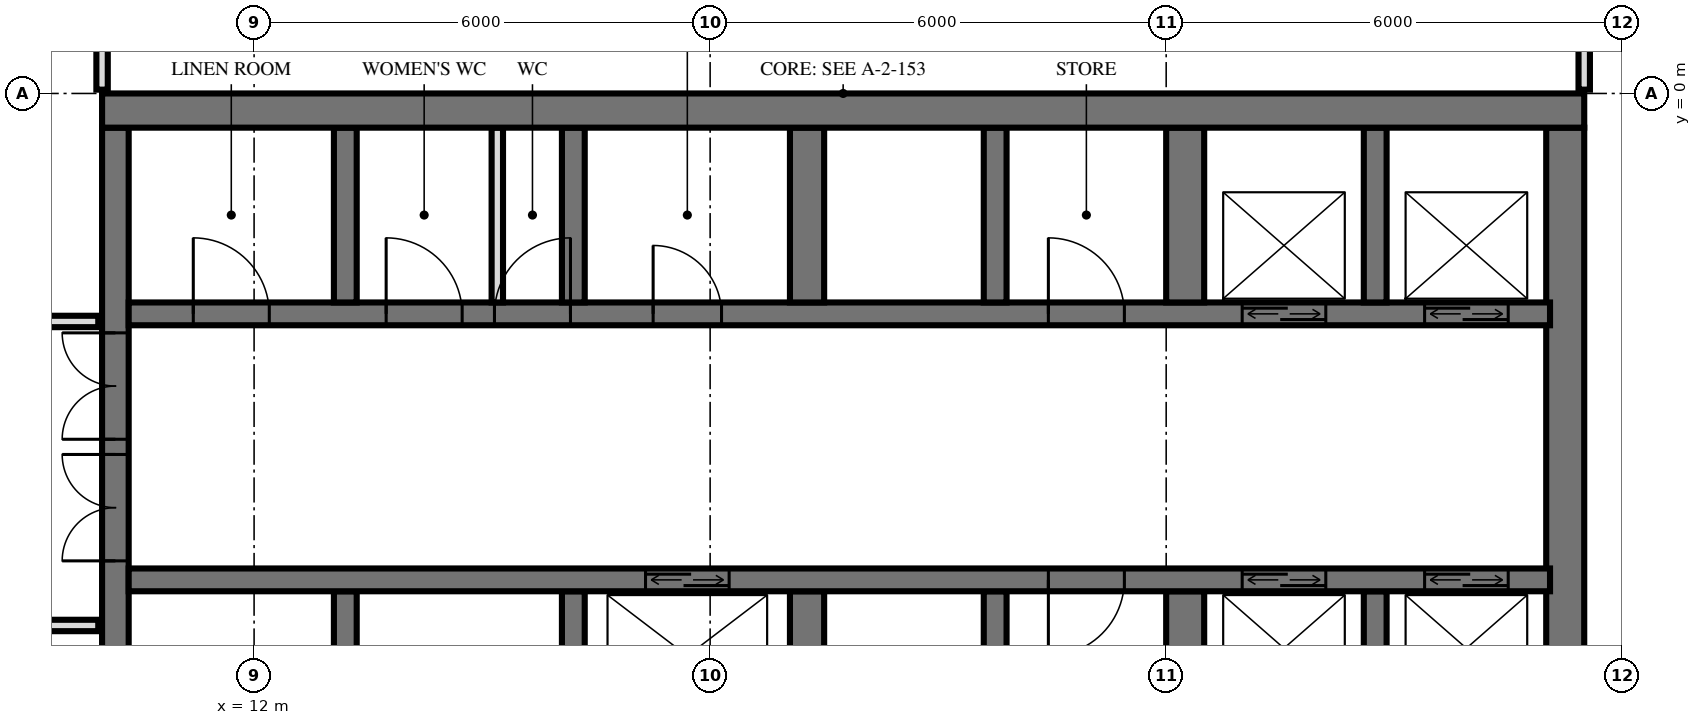
"""IFC4 building model, lengths in metres.
Left out: names, types, materials, properties, quantities, classifications, styles, units other than length and angle.
Written with IfcOpenShell. Run it as: python <this file> out.ifc"""

import sys

from ifc_helpers import new_model, si_unit, direction, frame, frame_2d, origin, place, context, subcontext, project, spatial, rectangle, extrude, element, fill, save


model = new_model("IFC4")
c1 = context("Model", 3, precision=1e-05, world=origin(), true_north=direction((0.0, 1.0)))
c2 = subcontext(c1, "Body", "Model", "MODEL_VIEW")
j1 = project(units=[si_unit("LENGTHUNIT", "METRE"), si_unit("PLANEANGLEUNIT", "RADIAN")], contexts=[c1])
p1 = place(None, origin())
s1 = spatial("IfcSite", under=j1, at=p1, CompositionType="ELEMENT")
p2 = place(p1, origin())
s2 = spatial("IfcBuilding", under=s1, at=p2, CompositionType="ELEMENT")
p3 = place(p2, frame((0.0, 0.0, 88.8)))
s3 = spatial("IfcBuildingStorey", under=s2, at=p3, CompositionType="ELEMENT", Elevation=88.8)
p4 = place(p3, frame((10.0, -0.225, 0.0), z_axis=(0.0, 0.0, 1.0), x_axis=(1.0, 0.0, 0.0)))
e1 = element("IfcWall", 1, at=p4, inside=s3, PredefinedType="SHEAR", context=c2, shape_type="SweptSolid", body=[
    extrude(rectangle(XDim=19.5, YDim=0.45, at=frame_2d((9.75, 0.0))), origin(), (0.0, 0.0, 1.0), 3.6),
])
p5 = place(p3, frame((10.175, -14.55, 0.0), z_axis=(0.0, 0.0, 1.0), x_axis=(0.0, 1.0, 0.0)))
e2 = element("IfcWall", 2, at=p5, inside=s3, PredefinedType="SHEAR", context=c2, shape_type="SweptSolid", body=[
    extrude(rectangle(XDim=14.1, YDim=0.35, at=frame_2d((7.05, 0.0))), origin(), (0.0, 0.0, 1.0), 3.6),
])
p6 = place(p5, frame((8.4, 0.0, 0.0)))
e3 = element("IfcOpeningElement", 3, at=p6, cuts=e2, PredefinedType="OPENING", context=c2, shape_type="SweptSolid", body=[
    extrude(rectangle(XDim=1.4, YDim=2.4, at=frame_2d((0.7, 1.2))), frame((0.0, 0.185, 0.0), z_axis=(0.0, -1.0, 0.0), x_axis=(1.0, 0.0, 0.0)), (0.0, 0.0, 1.0), 0.37),
])
p7 = place(p5, frame((10.0, 0.0, 0.0)))
e4 = element("IfcOpeningElement", 4, at=p7, cuts=e2, PredefinedType="OPENING", context=c2, shape_type="SweptSolid", body=[
    extrude(rectangle(XDim=1.4, YDim=2.4, at=frame_2d((0.7, 1.2))), frame((0.0, 0.185, 0.0), z_axis=(0.0, -1.0, 0.0), x_axis=(1.0, 0.0, 0.0)), (0.0, 0.0, 1.0), 0.37),
])
p8 = place(p5, frame((4.0, 0.0, 0.0)))
e5 = element("IfcOpeningElement", 5, at=p8, cuts=e2, PredefinedType="OPENING", context=c2, shape_type="SweptSolid", body=[
    extrude(rectangle(XDim=1.2, YDim=2.1, at=frame_2d((0.6, 1.05))), frame((0.0, 0.185, 0.0), z_axis=(0.0, -1.0, 0.0), x_axis=(1.0, 0.0, 0.0)), (0.0, 0.0, 1.0), 0.37),
])
p9 = place(p3, frame((29.25, -14.55, 0.0), z_axis=(0.0, 0.0, 1.0), x_axis=(0.0, 1.0, 0.0)))
e6 = element("IfcWall", 6, at=p9, inside=s3, PredefinedType="SHEAR", context=c2, shape_type="SweptSolid", body=[
    extrude(rectangle(XDim=14.1, YDim=0.5, at=frame_2d((7.05, 0.0))), origin(), (0.0, 0.0, 1.0), 3.6),
])
p10 = place(p3, frame((10.35, -2.9, 0.0), z_axis=(0.0, 0.0, 1.0), x_axis=(1.0, 0.0, 0.0)))
e7 = element("IfcWall", 7, at=p10, inside=s3, PredefinedType="SHEAR", context=c2, shape_type="SweptSolid", body=[
    extrude(rectangle(XDim=18.7, YDim=0.3, at=frame_2d((9.35, 0.0))), origin(), (0.0, 0.0, 1.0), 3.6),
])
p11 = place(p10, frame((14.65, 0.0, 0.0)))
e8 = element("IfcOpeningElement", 8, at=p11, cuts=e7, PredefinedType="OPENING", context=c2, shape_type="SweptSolid", body=[
    extrude(rectangle(XDim=1.1, YDim=2.1, at=frame_2d((0.55, 1.05))), frame((0.0, 0.16, 0.0), z_axis=(0.0, -1.0, 0.0), x_axis=(1.0, 0.0, 0.0)), (0.0, 0.0, 1.0), 0.32),
])
p12 = place(p10, frame((17.05, 0.0, 0.0)))
e9 = element("IfcOpeningElement", 9, at=p12, cuts=e7, PredefinedType="OPENING", context=c2, shape_type="SweptSolid", body=[
    extrude(rectangle(XDim=1.1, YDim=2.1, at=frame_2d((0.55, 1.05))), frame((0.0, 0.16, 0.0), z_axis=(0.0, -1.0, 0.0), x_axis=(1.0, 0.0, 0.0)), (0.0, 0.0, 1.0), 0.32),
])
p13 = place(p10, frame((6.9, 0.0, 0.0)))
e10 = element("IfcOpeningElement", 10, at=p13, cuts=e7, PredefinedType="OPENING", context=c2, shape_type="SweptSolid", body=[
    extrude(rectangle(XDim=0.9, YDim=2.1, at=frame_2d((0.45, 1.05))), frame((0.0, 0.16, 0.0), z_axis=(0.0, -1.0, 0.0), x_axis=(1.0, 0.0, 0.0)), (0.0, 0.0, 1.0), 0.32),
])
p14 = place(p10, frame((0.85, 0.0, 0.0)))
e11 = element("IfcOpeningElement", 11, at=p14, cuts=e7, PredefinedType="OPENING", context=c2, shape_type="SweptSolid", body=[
    extrude(rectangle(XDim=1.0, YDim=2.1, at=frame_2d((0.5, 1.05))), frame((0.0, 0.16, 0.0), z_axis=(0.0, -1.0, 0.0), x_axis=(1.0, 0.0, 0.0)), (0.0, 0.0, 1.0), 0.32),
])
p15 = place(p10, frame((3.387, 0.0, 0.0)))
e12 = element("IfcOpeningElement", 12, at=p15, cuts=e7, PredefinedType="OPENING", context=c2, shape_type="SweptSolid", body=[
    extrude(rectangle(XDim=1.0, YDim=2.1, at=frame_2d((0.5, 1.05))), frame((0.0, 0.16, 0.0), z_axis=(0.0, -1.0, 0.0), x_axis=(1.0, 0.0, 0.0)), (0.0, 0.0, 1.0), 0.32),
])
p16 = place(p10, frame((4.812, 0.0, 0.0)))
e13 = element("IfcOpeningElement", 13, at=p16, cuts=e7, PredefinedType="OPENING", context=c2, shape_type="SweptSolid", body=[
    extrude(rectangle(XDim=1.0, YDim=2.1, at=frame_2d((0.5, 1.05))), frame((0.0, 0.16, 0.0), z_axis=(0.0, -1.0, 0.0), x_axis=(1.0, 0.0, 0.0)), (0.0, 0.0, 1.0), 0.32),
])
p17 = place(p10, frame((12.1, 0.0, 0.0)))
e14 = element("IfcOpeningElement", 14, at=p17, cuts=e7, PredefinedType="OPENING", context=c2, shape_type="SweptSolid", body=[
    extrude(rectangle(XDim=1.0, YDim=2.1, at=frame_2d((0.5, 1.05))), frame((0.0, 0.16, 0.0), z_axis=(0.0, -1.0, 0.0), x_axis=(1.0, 0.0, 0.0)), (0.0, 0.0, 1.0), 0.32),
])
p18 = place(p3, frame((10.35, -6.4, 0.0), z_axis=(0.0, 0.0, 1.0), x_axis=(1.0, 0.0, 0.0)))
e15 = element("IfcWall", 15, at=p18, inside=s3, PredefinedType="SHEAR", context=c2, shape_type="SweptSolid", body=[
    extrude(rectangle(XDim=18.7, YDim=0.3, at=frame_2d((9.35, 0.0))), origin(), (0.0, 0.0, 1.0), 3.6),
])
p19 = place(p18, frame((14.65, 0.0, 0.0)))
e16 = element("IfcOpeningElement", 16, at=p19, cuts=e15, PredefinedType="OPENING", context=c2, shape_type="SweptSolid", body=[
    extrude(rectangle(XDim=1.1, YDim=2.1, at=frame_2d((0.55, 1.05))), frame((0.0, 0.16, 0.0), z_axis=(0.0, -1.0, 0.0), x_axis=(1.0, 0.0, 0.0)), (0.0, 0.0, 1.0), 0.32),
])
p20 = place(p18, frame((17.05, 0.0, 0.0)))
e17 = element("IfcOpeningElement", 17, at=p20, cuts=e15, PredefinedType="OPENING", context=c2, shape_type="SweptSolid", body=[
    extrude(rectangle(XDim=1.1, YDim=2.1, at=frame_2d((0.55, 1.05))), frame((0.0, 0.16, 0.0), z_axis=(0.0, -1.0, 0.0), x_axis=(1.0, 0.0, 0.0)), (0.0, 0.0, 1.0), 0.32),
])
p21 = place(p18, frame((6.8, 0.0, 0.0)))
e18 = element("IfcOpeningElement", 18, at=p21, cuts=e15, PredefinedType="OPENING", context=c2, shape_type="SweptSolid", body=[
    extrude(rectangle(XDim=1.1, YDim=2.1, at=frame_2d((0.55, 1.05))), frame((0.0, 0.16, 0.0), z_axis=(0.0, -1.0, 0.0), x_axis=(1.0, 0.0, 0.0)), (0.0, 0.0, 1.0), 0.32),
])
p22 = place(p18, frame((12.1, 0.0, 0.0)))
e19 = element("IfcOpeningElement", 19, at=p22, cuts=e15, PredefinedType="OPENING", context=c2, shape_type="SweptSolid", body=[
    extrude(rectangle(XDim=1.0, YDim=2.1, at=frame_2d((0.5, 1.05))), frame((0.0, 0.16, 0.0), z_axis=(0.0, -1.0, 0.0), x_axis=(1.0, 0.0, 0.0)), (0.0, 0.0, 1.0), 0.32),
])
for number, where, z_axis, x_axis in (
    (20, (13.2, -2.75, 0.0), (0.0, 0.0, 1.0), (0.0, 1.0, 0.0)),
    (21, (13.2, -8.85, 0.0), (0.0, 0.0, 1.0), (0.0, 1.0, 0.0)),
    (22, (16.2, -2.75, 0.0), (0.0, 0.0, 1.0), (0.0, 1.0, 0.0)),
    (23, (16.2, -8.85, 0.0), (0.0, 0.0, 1.0), (0.0, 1.0, 0.0)),
):
    element("IfcWall", number, at=place(p3, frame(where, z_axis=z_axis, x_axis=x_axis)), inside=s3, PredefinedType="SHEAR", context=c2, shape_type="SweptSolid", body=[
        extrude(rectangle(XDim=2.3, YDim=0.3, at=frame_2d((1.15, 0.0))), origin(), (0.0, 0.0, 1.0), 3.6),
    ])
for number, where, z_axis, x_axis in (
    (24, (19.275, -2.75, 0.0), (0.0, 0.0, 1.0), (0.0, 1.0, 0.0)),
    (25, (19.275, -8.85, 0.0), (0.0, 0.0, 1.0), (0.0, 1.0, 0.0)),
):
    element("IfcWall", number, at=place(p3, frame(where, z_axis=z_axis, x_axis=x_axis)), inside=s3, PredefinedType="SHEAR", context=c2, shape_type="SweptSolid", body=[
        extrude(rectangle(XDim=2.3, YDim=0.45, at=frame_2d((1.15, 0.0))), origin(), (0.0, 0.0, 1.0), 3.6),
    ])
for number, where, z_axis, x_axis in (
    (26, (21.75, -2.75, 0.0), (0.0, 0.0, 1.0), (0.0, 1.0, 0.0)),
    (27, (21.75, -8.85, 0.0), (0.0, 0.0, 1.0), (0.0, 1.0, 0.0)),
):
    element("IfcWall", number, at=place(p3, frame(where, z_axis=z_axis, x_axis=x_axis)), inside=s3, PredefinedType="SHEAR", context=c2, shape_type="SweptSolid", body=[
        extrude(rectangle(XDim=2.3, YDim=0.3, at=frame_2d((1.15, 0.0))), origin(), (0.0, 0.0, 1.0), 3.6),
    ])
for number, where, z_axis, x_axis in (
    (28, (24.25, -2.75, 0.0), (0.0, 0.0, 1.0), (0.0, 1.0, 0.0)),
    (29, (24.25, -8.85, 0.0), (0.0, 0.0, 1.0), (0.0, 1.0, 0.0)),
):
    element("IfcWall", number, at=place(p3, frame(where, z_axis=z_axis, x_axis=x_axis)), inside=s3, PredefinedType="SHEAR", context=c2, shape_type="SweptSolid", body=[
        extrude(rectangle(XDim=2.3, YDim=0.5, at=frame_2d((1.15, 0.0))), origin(), (0.0, 0.0, 1.0), 3.6),
    ])
for number, where, z_axis, x_axis in (
    (30, (26.75, -2.75, 0.0), (0.0, 0.0, 1.0), (0.0, 1.0, 0.0)),
    (31, (26.75, -8.85, 0.0), (0.0, 0.0, 1.0), (0.0, 1.0, 0.0)),
):
    element("IfcWall", number, at=place(p3, frame(where, z_axis=z_axis, x_axis=x_axis)), inside=s3, PredefinedType="SHEAR", context=c2, shape_type="SweptSolid", body=[
        extrude(rectangle(XDim=2.3, YDim=0.3, at=frame_2d((1.15, 0.0))), origin(), (0.0, 0.0, 1.0), 3.6),
    ])
p23 = place(p3, frame((15.2, -2.75, 0.0), z_axis=(0.0, 0.0, 1.0), x_axis=(0.0, 1.0, 0.0)))
e32 = element("IfcWall", 32, at=p23, inside=s3, PredefinedType="PARTITIONING", context=c2, shape_type="SweptSolid", body=[
    extrude(rectangle(XDim=2.3, YDim=0.15, at=frame_2d((1.15, 0.0))), origin(), (0.0, 0.0, 1.0), 3.3),
])
p24 = place(p3, frame((29.5, 0.05, 0.0), z_axis=(0.0, 0.0, 1.0), x_axis=(0.0, 1.0, 0.0)))
e33 = element("IfcWall", 33, at=p24, inside=s3, PredefinedType="PARTITIONING", context=c2, shape_type="SweptSolid", body=[
    extrude(rectangle(XDim=0.827, YDim=0.15, at=frame_2d((0.414, 0.0))), origin(), (0.0, 0.0, 1.0), 3.32),
])
p25 = place(p3, frame((10.0, 0.05, 0.0), z_axis=(0.0, 0.0, 1.0), x_axis=(0.0, 1.0, 0.0)))
e34 = element("IfcWall", 34, at=p25, inside=s3, PredefinedType="PARTITIONING", context=c2, shape_type="SweptSolid", body=[
    extrude(rectangle(XDim=0.97, YDim=0.15, at=frame_2d((0.485, 0.0))), origin(), (0.0, 0.0, 1.0), 3.32),
])
p26 = place(p3, frame((-9.95, -7.0, 0.0), z_axis=(0.0, 0.0, 1.0), x_axis=(1.0, 0.0, 0.0)))
e35 = element("IfcWall", 35, at=p26, inside=s3, PredefinedType="PARTITIONING", context=c2, shape_type="SweptSolid", body=[
    extrude(rectangle(XDim=19.9, YDim=0.15, at=frame_2d((9.95, 0.0))), origin(), (0.0, 0.0, 1.0), 3.32),
])
p27 = place(p26, frame((9.45, 0.0, 0.0)))
e36 = element("IfcOpeningElement", 36, at=p27, cuts=e35, PredefinedType="OPENING", context=c2, shape_type="SweptSolid", body=[
    extrude(rectangle(XDim=1.0, YDim=2.1, at=frame_2d((0.5, 1.05))), frame((0.0, 0.085, 0.0), z_axis=(0.0, -1.0, 0.0), x_axis=(1.0, 0.0, 0.0)), (0.0, 0.0, 1.0), 0.17),
])
p28 = place(p26, frame((3.45, 0.0, 0.0)))
e37 = element("IfcOpeningElement", 37, at=p28, cuts=e35, PredefinedType="OPENING", context=c2, shape_type="SweptSolid", body=[
    extrude(rectangle(XDim=1.0, YDim=2.1, at=frame_2d((0.5, 1.05))), frame((0.0, 0.085, 0.0), z_axis=(0.0, -1.0, 0.0), x_axis=(1.0, 0.0, 0.0)), (0.0, 0.0, 1.0), 0.17),
])
p29 = place(p3, frame((-9.95, -3.0, 0.0), z_axis=(0.0, 0.0, 1.0), x_axis=(1.0, 0.0, 0.0)))
e38 = element("IfcWall", 38, at=p29, inside=s3, PredefinedType="PARTITIONING", context=c2, shape_type="SweptSolid", body=[
    extrude(rectangle(XDim=19.9, YDim=0.15, at=frame_2d((9.95, 0.0))), origin(), (0.0, 0.0, 1.0), 3.32),
])
p30 = place(p29, frame((0.95, 0.0, 0.0)))
e39 = element("IfcOpeningElement", 39, at=p30, cuts=e38, PredefinedType="OPENING", context=c2, shape_type="SweptSolid", body=[
    extrude(rectangle(XDim=1.0, YDim=2.1, at=frame_2d((0.5, 1.05))), frame((0.0, 0.085, 0.0), z_axis=(0.0, -1.0, 0.0), x_axis=(1.0, 0.0, 0.0)), (0.0, 0.0, 1.0), 0.17),
])
p31 = place(p29, frame((3.7, 0.0, 0.0)))
e40 = element("IfcOpeningElement", 40, at=p31, cuts=e38, PredefinedType="OPENING", context=c2, shape_type="SweptSolid", body=[
    extrude(rectangle(XDim=1.0, YDim=2.1, at=frame_2d((0.5, 1.05))), frame((0.0, 0.085, 0.0), z_axis=(0.0, -1.0, 0.0), x_axis=(1.0, 0.0, 0.0)), (0.0, 0.0, 1.0), 0.17),
])
p32 = place(p29, frame((6.7, 0.0, 0.0)))
e41 = element("IfcOpeningElement", 41, at=p32, cuts=e38, PredefinedType="OPENING", context=c2, shape_type="SweptSolid", body=[
    extrude(rectangle(XDim=1.0, YDim=2.1, at=frame_2d((0.5, 1.05))), frame((0.0, 0.085, 0.0), z_axis=(0.0, -1.0, 0.0), x_axis=(1.0, 0.0, 0.0)), (0.0, 0.0, 1.0), 0.17),
])
p33 = place(p29, frame((13.95, 0.0, 0.0)))
e42 = element("IfcOpeningElement", 42, at=p33, cuts=e38, PredefinedType="OPENING", context=c2, shape_type="SweptSolid", body=[
    extrude(rectangle(XDim=1.0, YDim=2.1, at=frame_2d((0.5, 1.05))), frame((0.0, 0.085, 0.0), z_axis=(0.0, -1.0, 0.0), x_axis=(1.0, 0.0, 0.0)), (0.0, 0.0, 1.0), 0.17),
])
p34 = place(p11, origin())
e43 = element("IfcDoor", 43, at=p34, inside=s3, OperationType="DOUBLE_DOOR_SLIDING", PredefinedType="USERDEFINED", context=c2, shape_type="SweptSolid", body=[
    extrude(rectangle(XDim=1.1, YDim=2.1, at=frame_2d((0.55, 1.05))), frame((0.0, 0.025, 0.0), z_axis=(0.0, -1.0, 0.0), x_axis=(1.0, 0.0, 0.0)), (0.0, 0.0, 1.0), 0.05),
])
fill(e8, e43)
p35 = place(p12, origin())
e44 = element("IfcDoor", 44, at=p35, inside=s3, OperationType="DOUBLE_DOOR_SLIDING", PredefinedType="USERDEFINED", context=c2, shape_type="SweptSolid", body=[
    extrude(rectangle(XDim=1.1, YDim=2.1, at=frame_2d((0.55, 1.05))), frame((0.0, 0.025, 0.0), z_axis=(0.0, -1.0, 0.0), x_axis=(1.0, 0.0, 0.0)), (0.0, 0.0, 1.0), 0.05),
])
fill(e9, e44)
p36 = place(p19, origin())
e45 = element("IfcDoor", 45, at=p36, inside=s3, OperationType="DOUBLE_DOOR_SLIDING", PredefinedType="USERDEFINED", context=c2, shape_type="SweptSolid", body=[
    extrude(rectangle(XDim=1.1, YDim=2.1, at=frame_2d((0.55, 1.05))), frame((0.0, 0.025, 0.0), z_axis=(0.0, -1.0, 0.0), x_axis=(1.0, 0.0, 0.0)), (0.0, 0.0, 1.0), 0.05),
])
fill(e16, e45)
p37 = place(p20, origin())
e46 = element("IfcDoor", 46, at=p37, inside=s3, OperationType="DOUBLE_DOOR_SLIDING", PredefinedType="USERDEFINED", context=c2, shape_type="SweptSolid", body=[
    extrude(rectangle(XDim=1.1, YDim=2.1, at=frame_2d((0.55, 1.05))), frame((0.0, 0.025, 0.0), z_axis=(0.0, -1.0, 0.0), x_axis=(1.0, 0.0, 0.0)), (0.0, 0.0, 1.0), 0.05),
])
fill(e17, e46)
p38 = place(p21, origin())
e47 = element("IfcDoor", 47, at=p38, inside=s3, OperationType="DOUBLE_DOOR_SLIDING", PredefinedType="USERDEFINED", context=c2, shape_type="SweptSolid", body=[
    extrude(rectangle(XDim=1.1, YDim=2.1, at=frame_2d((0.55, 1.05))), frame((0.0, 0.025, 0.0), z_axis=(0.0, -1.0, 0.0), x_axis=(1.0, 0.0, 0.0)), (0.0, 0.0, 1.0), 0.05),
])
fill(e18, e47)
p39 = place(p6, origin())
e48 = element("IfcDoor", 48, at=p39, inside=s3, OperationType="DOUBLE_DOOR_SINGLE_SWING", PredefinedType="DOOR", context=c2, shape_type="SweptSolid", body=[
    extrude(rectangle(XDim=1.4, YDim=2.4, at=frame_2d((0.7, 1.2))), frame((0.0, 0.025, 0.0), z_axis=(0.0, -1.0, 0.0), x_axis=(1.0, 0.0, 0.0)), (0.0, 0.0, 1.0), 0.05),
])
fill(e3, e48)
p40 = place(p7, origin())
e49 = element("IfcDoor", 49, at=p40, inside=s3, OperationType="DOUBLE_DOOR_SINGLE_SWING", PredefinedType="DOOR", context=c2, shape_type="SweptSolid", body=[
    extrude(rectangle(XDim=1.4, YDim=2.4, at=frame_2d((0.7, 1.2))), frame((0.0, 0.025, 0.0), z_axis=(0.0, -1.0, 0.0), x_axis=(1.0, 0.0, 0.0)), (0.0, 0.0, 1.0), 0.05),
])
fill(e4, e49)
p41 = place(p13, origin())
e50 = element("IfcDoor", 50, at=p41, inside=s3, OperationType="SINGLE_SWING_RIGHT", PredefinedType="DOOR", context=c2, shape_type="SweptSolid", body=[
    extrude(rectangle(XDim=0.9, YDim=2.1, at=frame_2d((0.45, 1.05))), frame((0.0, 0.025, 0.0), z_axis=(0.0, -1.0, 0.0), x_axis=(1.0, 0.0, 0.0)), (0.0, 0.0, 1.0), 0.05),
])
fill(e10, e50)
p42 = place(p14, origin())
e51 = element("IfcDoor", 51, at=p42, inside=s3, OperationType="SINGLE_SWING_RIGHT", PredefinedType="DOOR", context=c2, shape_type="SweptSolid", body=[
    extrude(rectangle(XDim=1.0, YDim=2.1, at=frame_2d((0.5, 1.05))), frame((0.0, 0.025, 0.0), z_axis=(0.0, -1.0, 0.0), x_axis=(1.0, 0.0, 0.0)), (0.0, 0.0, 1.0), 0.05),
])
fill(e11, e51)
p43 = place(p15, origin())
e52 = element("IfcDoor", 52, at=p43, inside=s3, OperationType="SINGLE_SWING_RIGHT", PredefinedType="DOOR", context=c2, shape_type="SweptSolid", body=[
    extrude(rectangle(XDim=1.0, YDim=2.1, at=frame_2d((0.5, 1.05))), frame((0.0, 0.025, 0.0), z_axis=(0.0, -1.0, 0.0), x_axis=(1.0, 0.0, 0.0)), (0.0, 0.0, 1.0), 0.05),
])
fill(e12, e52)
p44 = place(p16, origin())
e53 = element("IfcDoor", 53, at=p44, inside=s3, OperationType="SINGLE_SWING_LEFT", PredefinedType="DOOR", context=c2, shape_type="SweptSolid", body=[
    extrude(rectangle(XDim=1.0, YDim=2.1, at=frame_2d((0.5, 1.05))), frame((0.0, 0.025, 0.0), z_axis=(0.0, -1.0, 0.0), x_axis=(1.0, 0.0, 0.0)), (0.0, 0.0, 1.0), 0.05),
])
fill(e13, e53)
p45 = place(p17, origin())
e54 = element("IfcDoor", 54, at=p45, inside=s3, OperationType="SINGLE_SWING_RIGHT", PredefinedType="DOOR", context=c2, shape_type="SweptSolid", body=[
    extrude(rectangle(XDim=1.0, YDim=2.1, at=frame_2d((0.5, 1.05))), frame((0.0, 0.025, 0.0), z_axis=(0.0, -1.0, 0.0), x_axis=(1.0, 0.0, 0.0)), (0.0, 0.0, 1.0), 0.05),
])
fill(e14, e54)
p46 = place(p22, frame((0.5, 0.0, 0.0), z_axis=(0.0, 0.0, 1.0), x_axis=(-1.0, 0.0, 0.0)))
e55 = element("IfcDoor", 55, at=p46, inside=s3, OperationType="SINGLE_SWING_LEFT", PredefinedType="DOOR", context=c2, shape_type="SweptSolid", body=[
    extrude(rectangle(XDim=1.0, YDim=2.1, at=frame_2d((0.0, 1.05))), frame((0.0, -0.025, 0.0), z_axis=(0.0, 1.0, 0.0), x_axis=(-1.0, 0.0, 0.0)), (0.0, 0.0, 1.0), 0.05),
])
fill(e19, e55)
save(model, sys.argv[1])
